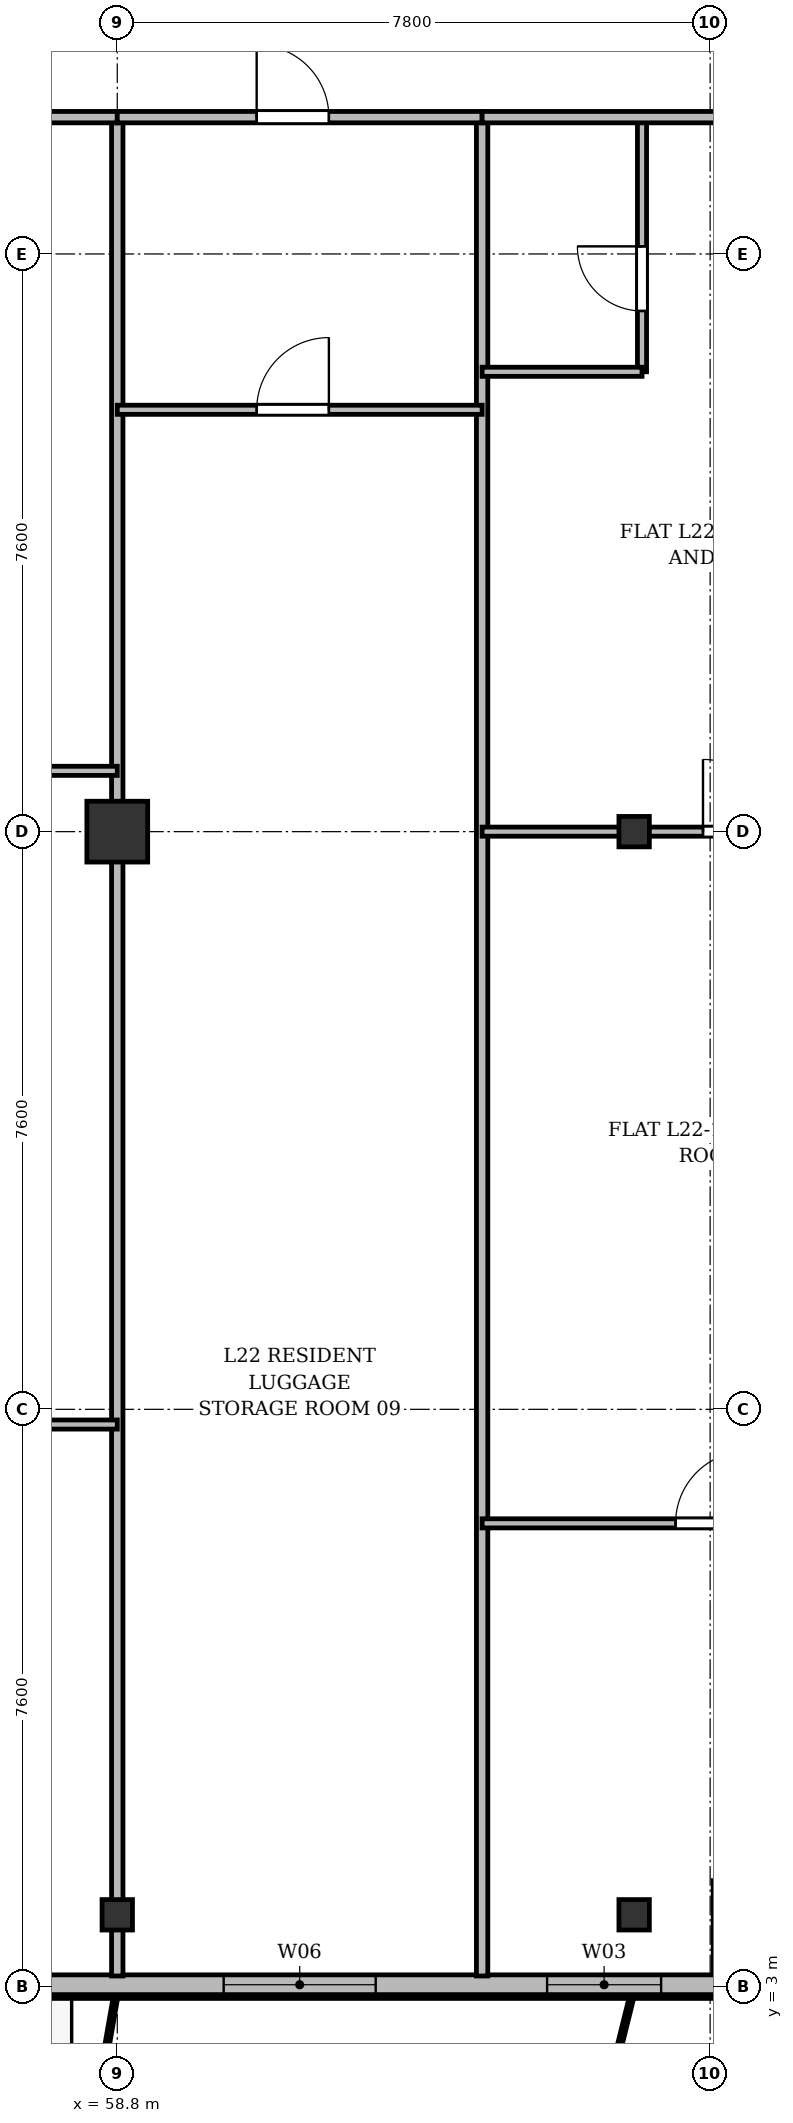
"""IFC4 building model, lengths in metres.
Left out: names, types, materials, properties, quantities, classifications, styles, units other than length and angle.
Written with IfcOpenShell. Run it as: python <this file> out.ifc"""

import sys

from ifc_helpers import new_model, si_unit, direction, frame, frame_2d, origin, origin_2d, place, context, subcontext, project, spatial, rectangle, i_section, extrude, source, transform, mapped, element, fill, save


model = new_model("IFC4")
c1 = context("Model", 3, precision=1e-05, world=origin(), true_north=direction((0.0, 1.0)))
c2 = subcontext(c1, "Body", "Model", "MODEL_VIEW")
j1 = project(units=[si_unit("LENGTHUNIT", "METRE"), si_unit("PLANEANGLEUNIT", "RADIAN")], contexts=[c1])
p1 = place(None, origin())
s1 = spatial("IfcSite", under=j1, at=p1, CompositionType="ELEMENT")
p2 = place(p1, origin())
s2 = spatial("IfcBuilding", under=s1, at=p2, CompositionType="ELEMENT")
p3 = place(p2, frame((0.0, 0.0, 88.9)))
s3 = spatial("IfcBuildingStorey", under=s2, at=p3, CompositionType="ELEMENT", Elevation=88.9)
m1 = source(origin(), c2, "Body", "SweptSolid", [
    extrude(i_section(OverallWidth=0.4, OverallDepth=0.4, WebThickness=0.022, FlangeThickness=0.035, at=origin_2d()), origin(), (0.0, 0.0, 1.0), 3.6),
])
p4 = place(p3, frame((58.8, 3.95, 0.0), z_axis=(0.0, 0.0, 1.0), x_axis=(1.0, 0.0, 0.0)))
e1 = element("IfcColumn", 1, at=p4, inside=s3, PredefinedType="COLUMN", context=c2, shape_type="MappedRepresentation", body=[
    mapped(m1, transform((0.0, 0.0, 0.0), x_axis=(1.0, 0.0, 0.0), y_axis=(0.0, 1.0, 0.0), z_axis=(0.0, 0.0, 1.0), scale=1.0)),
])
m2 = source(origin(), c2, "Body", "SweptSolid", [
    extrude(rectangle(XDim=0.8, YDim=0.8, at=origin_2d()), origin(), (0.0, 0.0, 1.0), 3.6),
])
p5 = place(p3, frame((58.8, 18.2, 0.0), z_axis=(0.0, 0.0, 1.0), x_axis=(1.0, 0.0, 0.0)))
e2 = element("IfcColumn", 2, at=p5, inside=s3, PredefinedType="COLUMN", context=c2, shape_type="MappedRepresentation", body=[
    mapped(m2, transform((0.0, 0.0, 0.0), x_axis=(1.0, 0.0, 0.0), y_axis=(0.0, 1.0, 0.0), z_axis=(0.0, 0.0, 1.0), scale=1.0)),
])
for number, where, z_axis, x_axis in (
    (3, (65.6, 3.95, 0.0), (0.0, 0.0, 1.0), (1.0, 0.0, 0.0)),
    (4, (65.6, 18.2, 0.0), (0.0, 0.0, 1.0), (1.0, 0.0, 0.0)),
):
    element("IfcColumn", number, at=place(p3, frame(where, z_axis=z_axis, x_axis=x_axis)), inside=s3, PredefinedType="COLUMN", context=c2, shape_type="MappedRepresentation", body=[
        mapped(m1, transform((0.0, 0.0, 0.0), x_axis=(1.0, 0.0, 0.0), y_axis=(0.0, 1.0, 0.0), z_axis=(0.0, 0.0, 1.0), scale=1.0)),
    ])
p6 = place(p3, frame((66.77, 4.4, 0.0), z_axis=(0.0, 0.0, 1.0), x_axis=(0.0, -1.0, 0.0)))
e5 = element("IfcWall", 5, at=p6, inside=s3, PredefinedType="SOLIDWALL", context=c2, shape_type="SweptSolid", body=[
    extrude(rectangle(XDim=1.5, YDim=0.26, at=frame_2d((0.75, 0.0))), origin(), (0.0, 0.0, 1.0), 2.752),
])
p7 = place(p3, frame((66.9, 3.03, 0.0), z_axis=(0.0, 0.0, 1.0), x_axis=(-1.0, 0.0, 0.0)))
e6 = element("IfcWall", 6, at=p7, inside=s3, PredefinedType="SOLIDWALL", context=c2, shape_type="SweptSolid", body=[
    extrude(rectangle(XDim=59.4, YDim=0.26, at=frame_2d((29.7, 0.0))), origin(), (0.0, 0.0, 1.0), 3.34),
])
p8 = place(p7, frame((0.945, 0.0, 0.9)))
e7 = element("IfcOpeningElement", 7, at=p8, cuts=e6, PredefinedType="OPENING", context=c2, shape_type="SweptSolid", body=[
    extrude(rectangle(XDim=1.5, YDim=1.75, at=frame_2d((0.75, 0.875))), frame((0.0, 0.14, 0.0), z_axis=(0.0, -1.0, 0.0), x_axis=(1.0, 0.0, 0.0)), (0.0, 0.0, 1.0), 0.28),
])
p9 = place(p7, frame((4.7, 0.0, 0.9)))
e8 = element("IfcOpeningElement", 8, at=p9, cuts=e6, PredefinedType="OPENING", context=c2, shape_type="SweptSolid", body=[
    extrude(rectangle(XDim=2.0, YDim=1.95, at=frame_2d((1.0, 0.975))), frame((0.0, 0.14, 0.0), z_axis=(0.0, -1.0, 0.0), x_axis=(1.0, 0.0, 0.0)), (0.0, 0.0, 1.0), 0.28),
])
p10 = place(p7, frame((9.18, 0.0, 0.0)))
e9 = element("IfcOpeningElement", 9, at=p10, cuts=e6, PredefinedType="OPENING", context=c2, shape_type="SweptSolid", body=[
    extrude(rectangle(XDim=1.2, YDim=2.2, at=frame_2d((0.6, 1.1))), frame((0.0, 0.14, 0.0), z_axis=(0.0, -1.0, 0.0), x_axis=(1.0, 0.0, 0.0)), (0.0, 0.0, 1.0), 0.28),
])
p11 = place(p7, frame((13.05, 0.0, 0.9)))
e10 = element("IfcOpeningElement", 10, at=p11, cuts=e6, PredefinedType="OPENING", context=c2, shape_type="SweptSolid", body=[
    extrude(rectangle(XDim=1.8, YDim=1.8, at=frame_2d((0.9, 0.9))), frame((0.0, 0.14, 0.0), z_axis=(0.0, -1.0, 0.0), x_axis=(1.0, 0.0, 0.0)), (0.0, 0.0, 1.0), 0.28),
])
p12 = place(p7, frame((16.35, 0.0, 0.9)))
e11 = element("IfcOpeningElement", 11, at=p12, cuts=e6, PredefinedType="OPENING", context=c2, shape_type="SweptSolid", body=[
    extrude(rectangle(XDim=1.5, YDim=1.75, at=frame_2d((0.75, 0.875))), frame((0.0, 0.14, 0.0), z_axis=(0.0, -1.0, 0.0), x_axis=(1.0, 0.0, 0.0)), (0.0, 0.0, 1.0), 0.28),
])
p13 = place(p7, frame((18.75, 0.0, 0.9)))
e12 = element("IfcOpeningElement", 12, at=p13, cuts=e6, PredefinedType="OPENING", context=c2, shape_type="SweptSolid", body=[
    extrude(rectangle(XDim=1.5, YDim=1.75, at=frame_2d((0.75, 0.875))), frame((0.0, 0.14, 0.0), z_axis=(0.0, -1.0, 0.0), x_axis=(1.0, 0.0, 0.0)), (0.0, 0.0, 1.0), 0.28),
])
p14 = place(p7, frame((20.9, 0.0, 0.9)))
e13 = element("IfcOpeningElement", 13, at=p14, cuts=e6, PredefinedType="OPENING", context=c2, shape_type="SweptSolid", body=[
    extrude(rectangle(XDim=2.0, YDim=1.95, at=frame_2d((1.0, 0.975))), frame((0.0, 0.14, 0.0), z_axis=(0.0, -1.0, 0.0), x_axis=(1.0, 0.0, 0.0)), (0.0, 0.0, 1.0), 0.28),
])
p15 = place(p7, frame((24.025, 0.0, 0.9)))
e14 = element("IfcOpeningElement", 14, at=p15, cuts=e6, PredefinedType="OPENING", context=c2, shape_type="SweptSolid", body=[
    extrude(rectangle(XDim=1.65, YDim=1.85, at=frame_2d((0.825, 0.925))), frame((0.0, 0.14, 0.0), z_axis=(0.0, -1.0, 0.0), x_axis=(1.0, 0.0, 0.0)), (0.0, 0.0, 1.0), 0.28),
])
p16 = place(p7, frame((27.45, 0.0, 0.9)))
e15 = element("IfcOpeningElement", 15, at=p16, cuts=e6, PredefinedType="OPENING", context=c2, shape_type="SweptSolid", body=[
    extrude(rectangle(XDim=1.8, YDim=1.8, at=frame_2d((0.9, 0.9))), frame((0.0, 0.14, 0.0), z_axis=(0.0, -1.0, 0.0), x_axis=(1.0, 0.0, 0.0)), (0.0, 0.0, 1.0), 0.28),
])
p17 = place(p7, frame((32.1, 0.0, 0.9)))
e16 = element("IfcOpeningElement", 16, at=p17, cuts=e6, PredefinedType="OPENING", context=c2, shape_type="SweptSolid", body=[
    extrude(rectangle(XDim=2.2, YDim=1.8, at=frame_2d((1.1, 0.9))), frame((0.0, 0.14, 0.0), z_axis=(0.0, -1.0, 0.0), x_axis=(1.0, 0.0, 0.0)), (0.0, 0.0, 1.0), 0.28),
])
p18 = place(p7, frame((40.301, 0.0, 0.0)))
e17 = element("IfcOpeningElement", 17, at=p18, cuts=e6, PredefinedType="OPENING", context=c2, shape_type="SweptSolid", body=[
    extrude(rectangle(XDim=1.2, YDim=2.2, at=frame_2d((0.6, 1.1))), frame((0.0, 0.14, 0.0), z_axis=(0.0, -1.0, 0.0), x_axis=(1.0, 0.0, 0.0)), (0.0, 0.0, 1.0), 0.28),
])
p19 = place(p7, frame((46.4, 0.0, 0.9)))
e18 = element("IfcOpeningElement", 18, at=p19, cuts=e6, PredefinedType="OPENING", context=c2, shape_type="SweptSolid", body=[
    extrude(rectangle(XDim=2.0, YDim=1.95, at=frame_2d((1.0, 0.975))), frame((0.0, 0.14, 0.0), z_axis=(0.0, -1.0, 0.0), x_axis=(1.0, 0.0, 0.0)), (0.0, 0.0, 1.0), 0.28),
])
p20 = place(p7, frame((54.558, 0.0, 0.0)))
e19 = element("IfcOpeningElement", 19, at=p20, cuts=e6, PredefinedType="OPENING", context=c2, shape_type="SweptSolid", body=[
    extrude(rectangle(XDim=1.2, YDim=2.2, at=frame_2d((0.6, 1.1))), frame((0.0, 0.14, 0.0), z_axis=(0.0, -1.0, 0.0), x_axis=(1.0, 0.0, 0.0)), (0.0, 0.0, 1.0), 0.28),
])
p21 = place(p7, frame((56.905, 0.0, 0.9)))
e20 = element("IfcOpeningElement", 20, at=p21, cuts=e6, PredefinedType="OPENING", context=c2, shape_type="SweptSolid", body=[
    extrude(rectangle(XDim=1.8, YDim=1.8, at=frame_2d((0.9, 0.9))), frame((0.0, 0.14, 0.0), z_axis=(0.0, -1.0, 0.0), x_axis=(1.0, 0.0, 0.0)), (0.0, 0.0, 1.0), 0.28),
])
p22 = place(p3, frame((58.8, 3.145, 0.0), z_axis=(0.0, 0.0, 1.0), x_axis=(0.0, 1.0, 0.0)))
e21 = element("IfcWall", 21, at=p22, inside=s3, PredefinedType="PARTITIONING", context=c2, shape_type="SweptSolid", body=[
    extrude(rectangle(XDim=24.455, YDim=0.15, at=frame_2d((12.228, 0.0))), origin(), (0.0, 0.0, 1.0), 2.84),
])
p23 = place(p3, frame((63.6, 3.145, 0.0), z_axis=(0.0, 0.0, 1.0), x_axis=(0.0, 1.0, 0.0)))
e22 = element("IfcWall", 22, at=p23, inside=s3, PredefinedType="PARTITIONING", context=c2, shape_type="SweptSolid", body=[
    extrude(rectangle(XDim=24.455, YDim=0.15, at=frame_2d((12.228, 0.0))), origin(), (0.0, 0.0, 1.0), 2.752),
])
p24 = place(p3, frame((51.0, 19.0, 0.0), z_axis=(0.0, 0.0, 1.0), x_axis=(1.0, 0.0, 0.0)))
e23 = element("IfcWall", 23, at=p24, inside=s3, PredefinedType="PARTITIONING", context=c2, shape_type="SweptSolid", body=[
    extrude(rectangle(XDim=7.8, YDim=0.12, at=frame_2d((3.9, 0.0))), origin(), (0.0, 0.0, 1.0), 2.84),
])
p25 = place(p24, frame((3.333, 0.0, 0.0)))
e24 = element("IfcOpeningElement", 24, at=p25, cuts=e23, PredefinedType="OPENING", context=c2, shape_type="SweptSolid", body=[
    extrude(rectangle(XDim=0.95, YDim=2.15, at=frame_2d((0.475, 1.075))), frame((0.0, 0.07, 0.0), z_axis=(0.0, -1.0, 0.0), x_axis=(1.0, 0.0, 0.0)), (0.0, 0.0, 1.0), 0.14),
])
p26 = place(p3, frame((51.0, 27.6, 0.0), z_axis=(0.0, 0.0, 1.0), x_axis=(1.0, 0.0, 0.0)))
e25 = element("IfcWall", 25, at=p26, inside=s3, PredefinedType="PARTITIONING", context=c2, shape_type="SweptSolid", body=[
    extrude(rectangle(XDim=7.8, YDim=0.15, at=frame_2d((3.9, 0.0))), origin(), (0.0, 0.0, 1.0), 2.84),
])
p27 = place(p26, frame((5.172, 0.0, 0.0)))
e26 = element("IfcOpeningElement", 26, at=p27, cuts=e25, PredefinedType="OPENING", context=c2, shape_type="SweptSolid", body=[
    extrude(rectangle(XDim=0.95, YDim=2.15, at=frame_2d((0.475, 1.075))), frame((0.0, 0.085, 0.0), z_axis=(0.0, -1.0, 0.0), x_axis=(1.0, 0.0, 0.0)), (0.0, 0.0, 1.0), 0.17),
])
p28 = place(p3, frame((54.9, 10.4, 0.0), z_axis=(0.0, 0.0, 1.0), x_axis=(1.0, 0.0, 0.0)))
e27 = element("IfcWall", 27, at=p28, inside=s3, PredefinedType="PARTITIONING", context=c2, shape_type="SweptSolid", body=[
    extrude(rectangle(XDim=3.9, YDim=0.12, at=frame_2d((1.95, 0.0))), origin(), (0.0, 0.0, 1.0), 2.84),
])
p29 = place(p28, frame((1.475, 0.0, 0.0)))
e28 = element("IfcOpeningElement", 28, at=p29, cuts=e27, PredefinedType="OPENING", context=c2, shape_type="SweptSolid", body=[
    extrude(rectangle(XDim=0.95, YDim=2.15, at=frame_2d((0.475, 1.075))), frame((0.0, 0.07, 0.0), z_axis=(0.0, -1.0, 0.0), x_axis=(1.0, 0.0, 0.0)), (0.0, 0.0, 1.0), 0.14),
])
p30 = place(p3, frame((58.8, 27.6, 0.0), z_axis=(0.0, 0.0, 1.0), x_axis=(1.0, 0.0, 0.0)))
e29 = element("IfcWall", 29, at=p30, inside=s3, PredefinedType="PARTITIONING", context=c2, shape_type="SweptSolid", body=[
    extrude(rectangle(XDim=4.8, YDim=0.15, at=frame_2d((2.4, 0.0))), origin(), (0.0, 0.0, 1.0), 2.84),
])
p31 = place(p30, frame((1.834, 0.0, 0.0)))
e30 = element("IfcOpeningElement", 30, at=p31, cuts=e29, PredefinedType="OPENING", context=c2, shape_type="SweptSolid", body=[
    extrude(rectangle(XDim=0.95, YDim=2.15, at=frame_2d((0.475, 1.075))), frame((0.0, 0.085, 0.0), z_axis=(0.0, -1.0, 0.0), x_axis=(1.0, 0.0, 0.0)), (0.0, 0.0, 1.0), 0.17),
])
p32 = place(p3, frame((58.8, 23.75, 0.0), z_axis=(0.0, 0.0, 1.0), x_axis=(1.0, 0.0, 0.0)))
e31 = element("IfcWall", 31, at=p32, inside=s3, PredefinedType="PARTITIONING", context=c2, shape_type="SweptSolid", body=[
    extrude(rectangle(XDim=4.8, YDim=0.12, at=frame_2d((2.4, 0.0))), origin(), (0.0, 0.0, 1.0), 2.84),
])
p33 = place(p32, frame((1.834, 0.0, 0.0)))
e32 = element("IfcOpeningElement", 32, at=p33, cuts=e31, PredefinedType="OPENING", context=c2, shape_type="SweptSolid", body=[
    extrude(rectangle(XDim=0.95, YDim=2.15, at=frame_2d((0.475, 1.075))), frame((0.0, 0.07, 0.0), z_axis=(0.0, -1.0, 0.0), x_axis=(1.0, 0.0, 0.0)), (0.0, 0.0, 1.0), 0.14),
])
p34 = place(p3, frame((63.6, 18.2, 0.0), z_axis=(0.0, 0.0, 1.0), x_axis=(1.0, 0.0, 0.0)))
e33 = element("IfcWall", 33, at=p34, inside=s3, PredefinedType="PARTITIONING", context=c2, shape_type="SweptSolid", body=[
    extrude(rectangle(XDim=6.04, YDim=0.12, at=frame_2d((3.02, 0.0))), origin(), (0.0, 0.0, 1.0), 2.752),
])
p35 = place(p34, frame((2.906, 0.0, 0.0)))
e34 = element("IfcOpeningElement", 34, at=p35, cuts=e33, PredefinedType="OPENING", context=c2, shape_type="SweptSolid", body=[
    extrude(rectangle(XDim=0.95, YDim=2.15, at=frame_2d((0.475, 1.075))), frame((0.0, 0.07, 0.0), z_axis=(0.0, -1.0, 0.0), x_axis=(1.0, 0.0, 0.0)), (0.0, 0.0, 1.0), 0.14),
])
p36 = place(p3, frame((65.704, 24.25, 0.0), z_axis=(0.0, 0.0, 1.0), x_axis=(0.0, 1.0, 0.0)))
e35 = element("IfcWall", 35, at=p36, inside=s3, PredefinedType="PARTITIONING", context=c2, shape_type="SweptSolid", body=[
    extrude(rectangle(XDim=3.35, YDim=0.12, at=frame_2d((1.675, 0.0))), origin(), (0.0, 0.0, 1.0), 2.84),
])
p37 = place(p36, frame((0.8, 0.0, 0.0)))
e36 = element("IfcOpeningElement", 36, at=p37, cuts=e35, PredefinedType="OPENING", context=c2, shape_type="SweptSolid", body=[
    extrude(rectangle(XDim=0.85, YDim=2.1, at=frame_2d((0.425, 1.05))), frame((0.0, 0.07, 0.0), z_axis=(0.0, -1.0, 0.0), x_axis=(1.0, 0.0, 0.0)), (0.0, 0.0, 1.0), 0.14),
])
p38 = place(p3, frame((63.6, 24.25, 0.0), z_axis=(0.0, 0.0, 1.0), x_axis=(1.0, 0.0, 0.0)))
e37 = element("IfcWall", 37, at=p38, inside=s3, PredefinedType="PARTITIONING", context=c2, shape_type="SweptSolid", body=[
    extrude(rectangle(XDim=2.104, YDim=0.12, at=frame_2d((1.052, 0.0))), origin(), (0.0, 0.0, 1.0), 2.84),
])
p39 = place(p3, frame((63.6, 27.6, 0.0), z_axis=(0.0, 0.0, 1.0), x_axis=(1.0, 0.0, 0.0)))
e38 = element("IfcWall", 38, at=p39, inside=s3, PredefinedType="PARTITIONING", context=c2, shape_type="SweptSolid", body=[
    extrude(rectangle(XDim=6.055, YDim=0.15, at=frame_2d((3.027, 0.0))), origin(), (0.0, 0.0, 1.0), 2.84),
])
p40 = place(p39, frame((3.961, 0.0, 0.0)))
e39 = element("IfcOpeningElement", 39, at=p40, cuts=e38, PredefinedType="OPENING", context=c2, shape_type="SweptSolid", body=[
    extrude(rectangle(XDim=0.95, YDim=2.15, at=frame_2d((0.475, 1.075))), frame((0.0, 0.085, 0.0), z_axis=(0.0, -1.0, 0.0), x_axis=(1.0, 0.0, 0.0)), (0.0, 0.0, 1.0), 0.17),
])
p41 = place(p3, frame((63.6, 9.1, 0.0), z_axis=(0.0, 0.0, 1.0), x_axis=(1.0, 0.0, 0.0)))
e40 = element("IfcWall", 40, at=p41, inside=s3, PredefinedType="PARTITIONING", context=c2, shape_type="SweptSolid", body=[
    extrude(rectangle(XDim=6.04, YDim=0.12, at=frame_2d((3.02, 0.0))), origin(), (0.0, 0.0, 1.0), 2.84),
])
p42 = place(p41, frame((2.545, 0.0, 0.0)))
e41 = element("IfcOpeningElement", 41, at=p42, cuts=e40, PredefinedType="OPENING", context=c2, shape_type="SweptSolid", body=[
    extrude(rectangle(XDim=0.95, YDim=2.15, at=frame_2d((0.475, 1.075))), frame((0.0, 0.07, 0.0), z_axis=(0.0, -1.0, 0.0), x_axis=(1.0, 0.0, 0.0)), (0.0, 0.0, 1.0), 0.14),
])
m3 = source(origin(), c2, "Body", "SweptSolid", [
    extrude(rectangle(XDim=1.5, YDim=1.75, at=frame_2d((0.75, 0.875))), frame((0.0, 0.03, 0.0), z_axis=(0.0, -1.0, 0.0), x_axis=(1.0, 0.0, 0.0)), (0.0, 0.0, 1.0), 0.06),
])
p43 = place(p8, origin())
e42 = element("IfcWindow", 42, at=p43, inside=s3, PartitioningType="SINGLE_PANEL", PredefinedType="WINDOW", context=c2, shape_type="MappedRepresentation", body=[
    mapped(m3, transform((0.0, 0.0, 0.0), x_axis=(1.0, 0.0, 0.0), y_axis=(0.0, 1.0, 0.0), z_axis=(0.0, 0.0, 1.0), scale=1.0)),
])
fill(e7, e42)
m4 = source(origin(), c2, "Body", "SweptSolid", [
    extrude(rectangle(XDim=2.0, YDim=1.95, at=frame_2d((1.0, 0.975))), frame((0.0, 0.03, 0.0), z_axis=(0.0, -1.0, 0.0), x_axis=(1.0, 0.0, 0.0)), (0.0, 0.0, 1.0), 0.06),
])
p44 = place(p9, origin())
e43 = element("IfcWindow", 43, at=p44, inside=s3, PartitioningType="SINGLE_PANEL", PredefinedType="WINDOW", context=c2, shape_type="MappedRepresentation", body=[
    mapped(m4, transform((0.0, 0.0, 0.0), x_axis=(1.0, 0.0, 0.0), y_axis=(0.0, 1.0, 0.0), z_axis=(0.0, 0.0, 1.0), scale=1.0)),
])
fill(e8, e43)
m5 = source(origin(), c2, "Body", "SweptSolid", [
    extrude(rectangle(XDim=0.95, YDim=2.15, at=frame_2d((0.475, 1.075))), frame((0.0, 0.025, 0.0), z_axis=(0.0, -1.0, 0.0), x_axis=(1.0, 0.0, 0.0)), (0.0, 0.0, 1.0), 0.05),
])
p45 = place(p31, origin())
e44 = element("IfcDoor", 44, at=p45, inside=s3, OperationType="SINGLE_SWING_LEFT", PredefinedType="DOOR", context=c2, shape_type="MappedRepresentation", body=[
    mapped(m5, transform((0.0, 0.0, 0.0), x_axis=(1.0, 0.0, 0.0), y_axis=(0.0, 1.0, 0.0), z_axis=(0.0, 0.0, 1.0), scale=1.0)),
])
fill(e30, e44)
p46 = place(p33, origin())
e45 = element("IfcDoor", 45, at=p46, inside=s3, OperationType="SINGLE_SWING_RIGHT", PredefinedType="DOOR", context=c2, shape_type="MappedRepresentation", body=[
    mapped(m5, transform((0.0, 0.0, 0.0), x_axis=(1.0, 0.0, 0.0), y_axis=(0.0, 1.0, 0.0), z_axis=(0.0, 0.0, 1.0), scale=1.0)),
])
fill(e32, e45)
p47 = place(p35, origin())
e46 = element("IfcDoor", 46, at=p47, inside=s3, OperationType="SINGLE_SWING_LEFT", PredefinedType="DOOR", context=c2, shape_type="MappedRepresentation", body=[
    mapped(m5, transform((0.0, 0.0, 0.0), x_axis=(1.0, 0.0, 0.0), y_axis=(0.0, 1.0, 0.0), z_axis=(0.0, 0.0, 1.0), scale=1.0)),
])
fill(e34, e46)
m6 = source(origin(), c2, "Body", "SweptSolid", [
    extrude(rectangle(XDim=0.85, YDim=2.1, at=frame_2d((0.425, 1.05))), frame((0.0, 0.025, 0.0), z_axis=(0.0, -1.0, 0.0), x_axis=(1.0, 0.0, 0.0)), (0.0, 0.0, 1.0), 0.05),
])
p48 = place(p37, origin())
e47 = element("IfcDoor", 47, at=p48, inside=s3, OperationType="SINGLE_SWING_RIGHT", PredefinedType="DOOR", context=c2, shape_type="MappedRepresentation", body=[
    mapped(m6, transform((0.0, 0.0, 0.0), x_axis=(1.0, 0.0, 0.0), y_axis=(0.0, 1.0, 0.0), z_axis=(0.0, 0.0, 1.0), scale=1.0)),
])
fill(e36, e47)
p49 = place(p42, origin())
e48 = element("IfcDoor", 48, at=p49, inside=s3, OperationType="SINGLE_SWING_RIGHT", PredefinedType="DOOR", context=c2, shape_type="MappedRepresentation", body=[
    mapped(m5, transform((0.0, 0.0, 0.0), x_axis=(1.0, 0.0, 0.0), y_axis=(0.0, 1.0, 0.0), z_axis=(0.0, 0.0, 1.0), scale=1.0)),
])
fill(e41, e48)
save(model, sys.argv[1])
